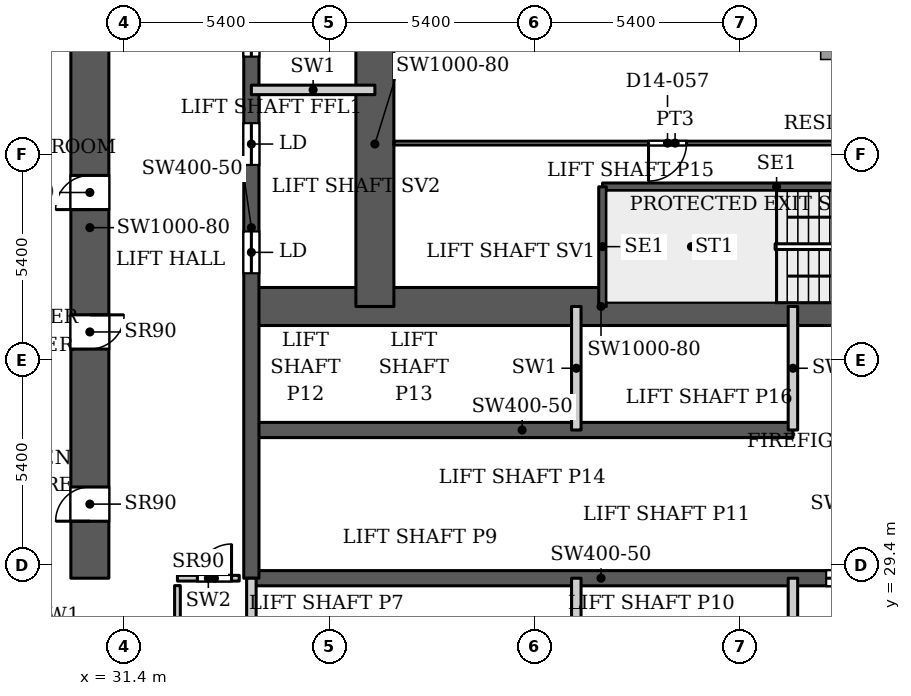
"""IFC4 building model, lengths in metres.
Left out: names, types, materials, properties, quantities, classifications, styles, units other than length and angle.
Written with IfcOpenShell. Run it as: python <this file> out.ifc"""

import sys

from ifc_helpers import new_model, si_unit, direction, frame, frame_2d, origin, place, context, subcontext, project, spatial, rectangle, extrude, source, transform, mapped, element, fill, save


model = new_model("IFC4")
c1 = context("Model", 3, precision=1e-05, world=origin(), true_north=direction((0.0, 1.0)))
c2 = subcontext(c1, "Body", "Model", "MODEL_VIEW")
j1 = project(units=[si_unit("LENGTHUNIT", "METRE"), si_unit("PLANEANGLEUNIT", "RADIAN")], contexts=[c1])
p1 = place(None, origin())
s1 = spatial("IfcSite", under=j1, at=p1, CompositionType="ELEMENT")
p2 = place(p1, origin())
s2 = spatial("IfcBuilding", under=s1, at=p2, CompositionType="ELEMENT")
p3 = place(p2, frame((0.0, 0.0, 61.7)))
s3 = spatial("IfcBuildingStorey", under=s2, at=p3, CompositionType="ELEMENT", Elevation=61.7)
p4 = place(p3, frame((34.75, 29.05, 0.0), z_axis=(0.0, 0.0, 1.0), x_axis=(1.0, 0.0, 0.0)))
e1 = element("IfcWall", 1, at=p4, inside=s3, PredefinedType="SHEAR", context=c2, shape_type="SweptSolid", body=[
    extrude(rectangle(XDim=18.4, YDim=0.4, at=frame_2d((9.2, 0.0))), origin(), (0.0, 0.0, 1.0), 3.9),
])
p5 = place(p4, frame((15.125, 0.0, 0.0)))
e2 = element("IfcOpeningElement", 2, at=p5, cuts=e1, PredefinedType="OPENING", context=c2, shape_type="SweptSolid", body=[
    extrude(rectangle(XDim=1.1, YDim=2.2, at=frame_2d((0.55, 1.1))), frame((0.0, 0.21, 0.0), z_axis=(0.0, -1.0, 0.0), x_axis=(1.0, 0.0, 0.0)), (0.0, 0.0, 1.0), 0.42),
])
p6 = place(p3, frame((34.75, 32.95, 0.0), z_axis=(0.0, 0.0, 1.0), x_axis=(1.0, 0.0, 0.0)))
e3 = element("IfcWall", 3, at=p6, inside=s3, PredefinedType="SHEAR", context=c2, shape_type="SweptSolid", body=[
    extrude(rectangle(XDim=14.25, YDim=0.4, at=frame_2d((7.125, 0.0))), origin(), (0.0, 0.0, 1.0), 3.9),
])
p7 = place(p3, frame((34.75, 36.2, 0.0), z_axis=(0.0, 0.0, 1.0), x_axis=(1.0, 0.0, 0.0)))
e4 = element("IfcWall", 4, at=p7, inside=s3, PredefinedType="SHEAR", context=c2, shape_type="SweptSolid", body=[
    extrude(rectangle(XDim=18.4, YDim=1.0, at=frame_2d((9.2, 0.0))), origin(), (0.0, 0.0, 1.0), 3.9),
])
p8 = place(p7, frame((16.9, 0.0, 0.0)))
e5 = element("IfcOpeningElement", 5, at=p8, cuts=e4, PredefinedType="OPENING", context=c2, shape_type="SweptSolid", body=[
    extrude(rectangle(XDim=1.0, YDim=2.2, at=frame_2d((0.5, 1.1))), frame((0.0, 0.51, 0.0), z_axis=(0.0, -1.0, 0.0), x_axis=(1.0, 0.0, 0.0)), (0.0, 0.0, 1.0), 1.02),
])
p9 = place(p3, frame((34.75, 29.05, 0.0), z_axis=(0.0, 0.0, 1.0), x_axis=(0.0, 1.0, 0.0)))
e6 = element("IfcWall", 6, at=p9, inside=s3, PredefinedType="SHEAR", context=c2, shape_type="SweptSolid", body=[
    extrude(rectangle(XDim=18.45, YDim=0.4, at=frame_2d((9.225, 0.0))), origin(), (0.0, 0.0, 1.0), 3.9),
])
p10 = place(p9, frame((8.025, 0.0, 0.0)))
e7 = element("IfcOpeningElement", 7, at=p10, cuts=e6, PredefinedType="OPENING", context=c2, shape_type="SweptSolid", body=[
    extrude(rectangle(XDim=1.1, YDim=2.2, at=frame_2d((0.55, 1.1))), frame((0.0, 0.21, 0.0), z_axis=(0.0, -1.0, 0.0), x_axis=(1.0, 0.0, 0.0)), (0.0, 0.0, 1.0), 0.42),
])
p11 = place(p9, frame((10.875, 0.0, 0.0)))
e8 = element("IfcOpeningElement", 8, at=p11, cuts=e6, PredefinedType="OPENING", context=c2, shape_type="SweptSolid", body=[
    extrude(rectangle(XDim=1.1, YDim=2.2, at=frame_2d((0.55, 1.1))), frame((0.0, 0.21, 0.0), z_axis=(0.0, -1.0, 0.0), x_axis=(1.0, 0.0, 0.0)), (0.0, 0.0, 1.0), 0.42),
])
p12 = place(p9, frame((13.725, 0.0, 0.0)))
e9 = element("IfcOpeningElement", 9, at=p12, cuts=e6, PredefinedType="OPENING", context=c2, shape_type="SweptSolid", body=[
    extrude(rectangle(XDim=1.1, YDim=2.2, at=frame_2d((0.55, 1.1))), frame((0.0, 0.21, 0.0), z_axis=(0.0, -1.0, 0.0), x_axis=(1.0, 0.0, 0.0)), (0.0, 0.0, 1.0), 0.42),
])
p13 = place(p9, frame((15.95, 0.0, 0.0)))
e10 = element("IfcOpeningElement", 10, at=p13, cuts=e6, PredefinedType="OPENING", context=c2, shape_type="SweptSolid", body=[
    extrude(rectangle(XDim=1.1, YDim=2.2, at=frame_2d((0.55, 1.1))), frame((0.0, 0.21, 0.0), z_axis=(0.0, -1.0, 0.0), x_axis=(1.0, 0.0, 0.0)), (0.0, 0.0, 1.0), 0.42),
])
p14 = place(p3, frame((38.0, 36.2, 0.0), z_axis=(0.0, 0.0, 1.0), x_axis=(0.0, 1.0, 0.0)))
e11 = element("IfcWall", 11, at=p14, inside=s3, PredefinedType="SHEAR", context=c2, shape_type="SweptSolid", body=[
    extrude(rectangle(XDim=8.55, YDim=1.0, at=frame_2d((4.275, 0.0))), origin(), (0.0, 0.0, 1.0), 3.9),
])
p15 = place(p3, frame((30.5, 29.05, 0.0), z_axis=(0.0, 0.0, 1.0), x_axis=(0.0, 1.0, 0.0)))
e12 = element("IfcWall", 12, at=p15, inside=s3, PredefinedType="SHEAR", context=c2, shape_type="SweptSolid", body=[
    extrude(rectangle(XDim=18.45, YDim=1.0, at=frame_2d((9.225, 0.0))), origin(), (0.0, 0.0, 1.0), 3.9),
])
p16 = place(p15, frame((1.5, 0.0, 0.0)))
e13 = element("IfcOpeningElement", 13, at=p16, cuts=e12, PredefinedType="OPENING", context=c2, shape_type="SweptSolid", body=[
    extrude(rectangle(XDim=0.9, YDim=2.2, at=frame_2d((0.45, 1.1))), frame((0.0, 0.51, 0.0), z_axis=(0.0, -1.0, 0.0), x_axis=(1.0, 0.0, 0.0)), (0.0, 0.0, 1.0), 1.02),
])
p17 = place(p15, frame((6.03, 0.0, 0.0)))
e14 = element("IfcOpeningElement", 14, at=p17, cuts=e12, PredefinedType="OPENING", context=c2, shape_type="SweptSolid", body=[
    extrude(rectangle(XDim=0.9, YDim=2.2, at=frame_2d((0.45, 1.1))), frame((0.0, 0.51, 0.0), z_axis=(0.0, -1.0, 0.0), x_axis=(1.0, 0.0, 0.0)), (0.0, 0.0, 1.0), 1.02),
])
p18 = place(p15, frame((9.7, 0.0, 0.0)))
e15 = element("IfcOpeningElement", 15, at=p18, cuts=e12, PredefinedType="OPENING", context=c2, shape_type="SweptSolid", body=[
    extrude(rectangle(XDim=0.9, YDim=2.2, at=frame_2d((0.45, 1.1))), frame((0.0, 0.51, 0.0), z_axis=(0.0, -1.0, 0.0), x_axis=(1.0, 0.0, 0.0)), (0.0, 0.0, 1.0), 1.02),
])
p19 = place(p3, frame((29.712, 26.072, 0.0), z_axis=(0.0, 0.0, 1.0), x_axis=(-0.511028049012, 0.859564036662, 0.0)))
e16 = element("IfcWall", 16, at=p19, inside=s3, PredefinedType="SOLIDWALL", context=c2, shape_type="SweptSolid", body=[
    extrude(rectangle(XDim=4.634, YDim=0.25, at=frame_2d((2.317, 0.0))), origin(), (0.0, 0.0, 1.0), 3.133),
])
p20 = place(p3, frame((27.195, 31.969, 0.0), z_axis=(0.0, 0.0, 1.0), x_axis=(0.052554995867, 0.998618031286, 0.0)))
e17 = element("IfcWall", 17, at=p20, inside=s3, PredefinedType="SOLIDWALL", context=c2, shape_type="SweptSolid", body=[
    extrude(rectangle(XDim=66.787, YDim=0.25, at=frame_2d((33.394, 0.0))), origin(), (0.0, 0.0, 1.0), 3.75),
])
p21 = place(p3, frame((43.99, 39.35, 0.0), z_axis=(0.0, 0.0, 1.0), x_axis=(1.0, 0.0, 0.0)))
e18 = element("IfcWall", 18, at=p21, inside=s3, PredefinedType="SHEAR", context=c2, shape_type="SweptSolid", body=[
    extrude(rectangle(XDim=9.16, YDim=0.2, at=frame_2d((4.58, 0.0))), origin(), (0.0, 0.0, 1.0), 3.9),
])
p22 = place(p3, frame((43.99, 36.2, 0.0), z_axis=(0.0, 0.0, 1.0), x_axis=(0.0, 1.0, 0.0)))
e19 = element("IfcWall", 19, at=p22, inside=s3, PredefinedType="SHEAR", context=c2, shape_type="SweptSolid", body=[
    extrude(rectangle(XDim=3.15, YDim=0.2, at=frame_2d((1.575, 0.0))), origin(), (0.0, 0.0, 1.0), 3.9),
])
for number, where, z_axis, x_axis in (
    (20, (34.75, 25.8, 0.0), (0.0, 0.0, 1.0), (0.0, 1.0, 0.0)),
    (21, (43.3, 25.8, 0.0), (0.0, 0.0, 1.0), (0.0, 1.0, 0.0)),
    (22, (43.3, 32.95, 0.0), (0.0, 0.0, 1.0), (0.0, 1.0, 0.0)),
    (23, (49.0, 25.8, 0.0), (0.0, 0.0, 1.0), (0.0, 1.0, 0.0)),
    (24, (49.0, 32.95, 0.0), (0.0, 0.0, 1.0), (0.0, 1.0, 0.0)),
    (25, (34.75, 41.9, 0.0), (0.0, 0.0, 1.0), (1.0, 0.0, 0.0)),
):
    element("IfcWall", number, at=place(p3, frame(where, z_axis=z_axis, x_axis=x_axis)), inside=s3, PredefinedType="PARTITIONING", context=c2, shape_type="SweptSolid", body=[
        extrude(rectangle(XDim=3.25, YDim=0.25, at=frame_2d((1.625, 0.0))), origin(), (0.0, 0.0, 1.0), 3.9),
    ])
p23 = place(p3, frame((32.805, 29.05, 0.0), z_axis=(0.0, 0.0, 1.0), x_axis=(1.0, 0.0, 0.0)))
e26 = element("IfcWall", 26, at=p23, inside=s3, PredefinedType="PARTITIONING", context=c2, shape_type="SweptSolid", body=[
    extrude(rectangle(XDim=1.625, YDim=0.15, at=frame_2d((0.812, 0.0))), origin(), (0.0, 0.0, 1.0), 3.9),
])
p24 = place(p23, frame((0.523, 0.0, 0.0)))
e27 = element("IfcOpeningElement", 27, at=p24, cuts=e26, PredefinedType="OPENING", context=c2, shape_type="SweptSolid", body=[
    extrude(rectangle(XDim=0.9, YDim=2.2, at=frame_2d((0.45, 1.1))), frame((0.0, 0.085, 0.0), z_axis=(0.0, -1.0, 0.0), x_axis=(1.0, 0.0, 0.0)), (0.0, 0.0, 1.0), 0.17),
])
p25 = place(p3, frame((32.805, 24.98, 0.0), z_axis=(0.0, 0.0, 1.0), x_axis=(0.0, 1.0, 0.0)))
e28 = element("IfcWall", 28, at=p25, inside=s3, PredefinedType="PARTITIONING", context=c2, shape_type="SweptSolid", body=[
    extrude(rectangle(XDim=3.875, YDim=0.15, at=frame_2d((1.938, 0.0))), origin(), (0.0, 0.0, 1.0), 3.9),
])
p26 = place(p3, frame((38.499, 40.5, 0.0), z_axis=(0.0, 0.0, 1.0), x_axis=(1.0, 0.0, 0.0)))
e29 = element("IfcWall", 29, at=p26, inside=s3, PredefinedType="PARTITIONING", context=c2, shape_type="SweptSolid", body=[
    extrude(rectangle(XDim=14.801, YDim=0.1, at=frame_2d((7.4, 0.0))), origin(), (0.0, 0.0, 1.0), 3.6),
])
p27 = place(p26, frame((6.701, 0.0, 0.0)))
e30 = element("IfcOpeningElement", 30, at=p27, cuts=e29, PredefinedType="OPENING", context=c2, shape_type="SweptSolid", body=[
    extrude(rectangle(XDim=1.0, YDim=2.1, at=frame_2d((0.5, 1.05))), frame((0.0, 0.06, 0.0), z_axis=(0.0, -1.0, 0.0), x_axis=(1.0, 0.0, 0.0)), (0.0, 0.0, 1.0), 0.12),
])
m1 = source(origin(), c2, "Body", "SweptSolid", [
    extrude(rectangle(XDim=1.1, YDim=2.2, at=frame_2d((0.55, 1.1))), frame((0.0, 0.025, 0.0), z_axis=(0.0, -1.0, 0.0), x_axis=(1.0, 0.0, 0.0)), (0.0, 0.0, 1.0), 0.05),
])
p28 = place(p10, origin())
e31 = element("IfcDoor", 31, at=p28, inside=s3, OperationType="SLIDING_TO_LEFT", PredefinedType="DOOR", context=c2, shape_type="MappedRepresentation", body=[
    mapped(m1, transform((0.0, 0.0, 0.0), x_axis=(1.0, 0.0, 0.0), y_axis=(0.0, 1.0, 0.0), z_axis=(0.0, 0.0, 1.0), scale=1.0)),
])
fill(e7, e31)
p29 = place(p11, origin())
e32 = element("IfcDoor", 32, at=p29, inside=s3, OperationType="SLIDING_TO_LEFT", PredefinedType="DOOR", context=c2, shape_type="MappedRepresentation", body=[
    mapped(m1, transform((0.0, 0.0, 0.0), x_axis=(1.0, 0.0, 0.0), y_axis=(0.0, 1.0, 0.0), z_axis=(0.0, 0.0, 1.0), scale=1.0)),
])
fill(e8, e32)
p30 = place(p12, origin())
e33 = element("IfcDoor", 33, at=p30, inside=s3, OperationType="SLIDING_TO_LEFT", PredefinedType="DOOR", context=c2, shape_type="MappedRepresentation", body=[
    mapped(m1, transform((0.0, 0.0, 0.0), x_axis=(1.0, 0.0, 0.0), y_axis=(0.0, 1.0, 0.0), z_axis=(0.0, 0.0, 1.0), scale=1.0)),
])
fill(e9, e33)
p31 = place(p5, origin())
e34 = element("IfcDoor", 34, at=p31, inside=s3, OperationType="SLIDING_TO_LEFT", PredefinedType="DOOR", context=c2, shape_type="MappedRepresentation", body=[
    mapped(m1, transform((0.0, 0.0, 0.0), x_axis=(1.0, 0.0, 0.0), y_axis=(0.0, 1.0, 0.0), z_axis=(0.0, 0.0, 1.0), scale=1.0)),
])
fill(e2, e34)
m2 = source(origin(), c2, "Body", "SweptSolid", [
    extrude(rectangle(XDim=0.9, YDim=2.2, at=frame_2d((0.45, 1.1))), frame((0.0, 0.025, 0.0), z_axis=(0.0, -1.0, 0.0), x_axis=(1.0, 0.0, 0.0)), (0.0, 0.0, 1.0), 0.05),
])
p32 = place(p16, origin())
e35 = element("IfcDoor", 35, at=p32, inside=s3, OperationType="SINGLE_SWING_LEFT", PredefinedType="DOOR", context=c2, shape_type="MappedRepresentation", body=[
    mapped(m2, transform((0.0, 0.0, 0.0), x_axis=(1.0, 0.0, 0.0), y_axis=(0.0, 1.0, 0.0), z_axis=(0.0, 0.0, 1.0), scale=1.0)),
])
fill(e13, e35)
p33 = place(p17, origin())
e36 = element("IfcDoor", 36, at=p33, inside=s3, OperationType="SINGLE_SWING_RIGHT", PredefinedType="DOOR", context=c2, shape_type="MappedRepresentation", body=[
    mapped(m2, transform((0.0, 0.0, 0.0), x_axis=(1.0, 0.0, 0.0), y_axis=(0.0, 1.0, 0.0), z_axis=(0.0, 0.0, 1.0), scale=1.0)),
])
fill(e14, e36)
p34 = place(p18, origin())
e37 = element("IfcDoor", 37, at=p34, inside=s3, OperationType="SINGLE_SWING_LEFT", PredefinedType="DOOR", context=c2, shape_type="MappedRepresentation", body=[
    mapped(m2, transform((0.0, 0.0, 0.0), x_axis=(1.0, 0.0, 0.0), y_axis=(0.0, 1.0, 0.0), z_axis=(0.0, 0.0, 1.0), scale=1.0)),
])
fill(e15, e37)
p35 = place(p24, origin())
e38 = element("IfcDoor", 38, at=p35, inside=s3, OperationType="SINGLE_SWING_LEFT", PredefinedType="DOOR", context=c2, shape_type="MappedRepresentation", body=[
    mapped(m2, transform((0.0, 0.0, 0.0), x_axis=(1.0, 0.0, 0.0), y_axis=(0.0, 1.0, 0.0), z_axis=(0.0, 0.0, 1.0), scale=1.0)),
])
fill(e27, e38)
m3 = source(origin(), c2, "Body", "SweptSolid", [
    extrude(rectangle(XDim=1.0, YDim=2.1, at=frame_2d((0.5, 1.05))), frame((0.0, 0.025, 0.0), z_axis=(0.0, -1.0, 0.0), x_axis=(1.0, 0.0, 0.0)), (0.0, 0.0, 1.0), 0.05),
])
p36 = place(p27, origin())
e39 = element("IfcDoor", 39, at=p36, inside=s3, OperationType="SINGLE_SWING_RIGHT", PredefinedType="DOOR", context=c2, shape_type="MappedRepresentation", body=[
    mapped(m3, transform((0.0, 0.0, 0.0), x_axis=(1.0, 0.0, 0.0), y_axis=(0.0, 1.0, 0.0), z_axis=(0.0, 0.0, 1.0), scale=1.0)),
])
fill(e30, e39)
save(model, sys.argv[1])
